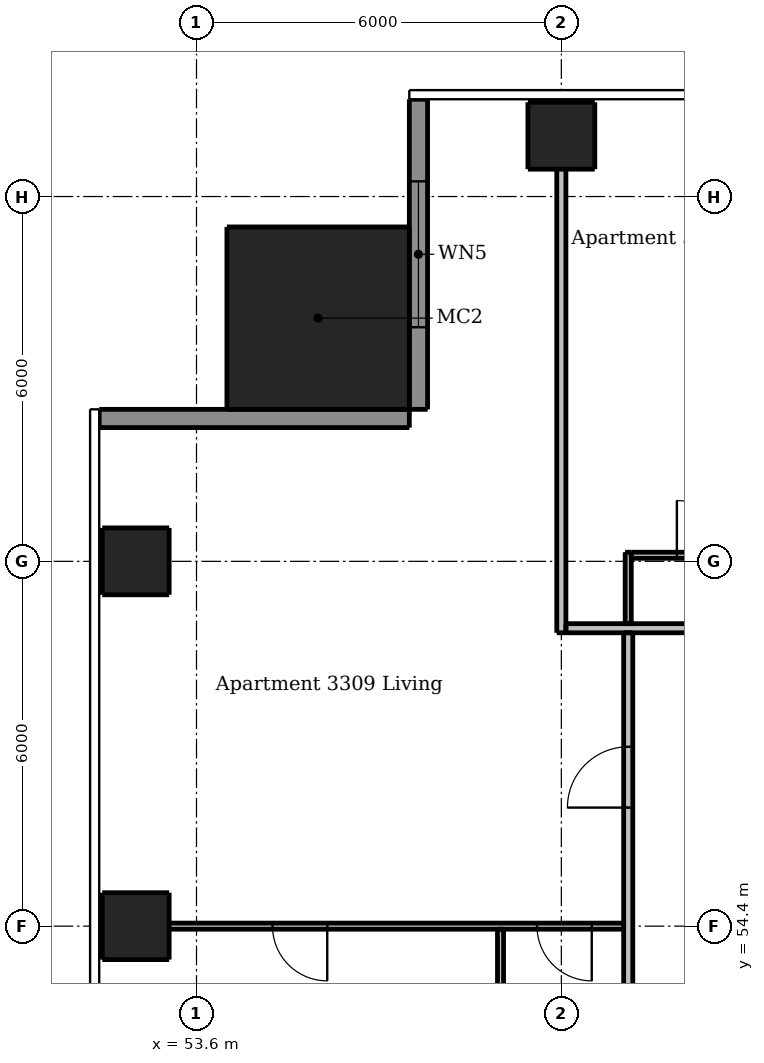
"""IFC4 building model, lengths in metres.
Left out: names, types, materials, properties, quantities, classifications, styles, units other than length and angle.
Written with IfcOpenShell. Run it as: python <this file> out.ifc"""

import sys

from ifc_helpers import new_model, si_unit, direction, frame, frame_2d, origin, origin_2d, place, context, subcontext, project, spatial, rectangle, extrude, element, fill, save


model = new_model("IFC4")
c1 = context("Model", 3, precision=1e-05, world=origin(), true_north=direction((0.0, 1.0)))
c2 = subcontext(c1, "Body", "Model", "MODEL_VIEW")
j1 = project(units=[si_unit("LENGTHUNIT", "METRE"), si_unit("PLANEANGLEUNIT", "RADIAN")], contexts=[c1])
p1 = place(None, origin())
s1 = spatial("IfcSite", under=j1, at=p1, CompositionType="ELEMENT")
p2 = place(p1, origin())
s2 = spatial("IfcBuilding", under=s1, at=p2, CompositionType="ELEMENT")
p3 = place(p2, frame((0.0, 0.0, 121.6)))
s3 = spatial("IfcBuildingStorey", under=s2, at=p3, CompositionType="ELEMENT", Elevation=121.6)
for number, where, z_axis, x_axis in (
    (1, (59.6, 67.4, 0.0), (0.0, 0.0, 1.0), (1.0, 0.0, 0.0)),
    (2, (52.6, 54.4, 0.0), (0.0, 0.0, 1.0), (1.0, 0.0, 0.0)),
    (3, (52.6, 60.4, 0.0), (0.0, 0.0, 1.0), (1.0, 0.0, 0.0)),
):
    element("IfcColumn", number, at=place(p3, frame(where, z_axis=z_axis, x_axis=x_axis)), inside=s3, PredefinedType="COLUMN", context=c2, shape_type="SweptSolid", body=[
        extrude(rectangle(XDim=1.1, YDim=1.1, at=origin_2d()), origin(), (0.0, 0.0, 1.0), 2.95),
    ])
p4 = place(p3, frame((55.6, 64.4, 0.0), z_axis=(0.0, 0.0, 1.0), x_axis=(1.0, 0.0, 0.0)))
e4 = element("IfcColumn", 4, at=p4, inside=s3, PredefinedType="COLUMN", context=c2, shape_type="SweptSolid", body=[
    extrude(rectangle(XDim=3.0, YDim=3.0, at=origin_2d()), origin(), (0.0, 0.0, 1.0), 3.3),
])
p5 = place(p3, frame((57.25, 68.0, 0.0), z_axis=(0.0, 0.0, 1.0), x_axis=(0.0, -1.0, 0.0)))
e5 = element("IfcWall", 5, at=p5, inside=s3, PredefinedType="SOLIDWALL", context=c2, shape_type="SweptSolid", body=[
    extrude(rectangle(XDim=5.1, YDim=0.3, at=frame_2d((2.55, 0.0))), origin(), (0.0, 0.0, 1.0), 2.95),
])
p6 = place(p5, frame((1.35, 0.0, 0.15)))
e6 = element("IfcOpeningElement", 6, at=p6, cuts=e5, PredefinedType="OPENING", context=c2, shape_type="SweptSolid", body=[
    extrude(rectangle(XDim=2.4, YDim=2.1, at=frame_2d((1.2, 1.05))), frame((0.0, 0.16, 0.0), z_axis=(0.0, -1.0, 0.0), x_axis=(1.0, 0.0, 0.0)), (0.0, 0.0, 1.0), 0.32),
])
p7 = place(p3, frame((57.1, 62.75, 0.0), z_axis=(0.0, 0.0, 1.0), x_axis=(-1.0, 0.0, 0.0)))
e7 = element("IfcWall", 7, at=p7, inside=s3, PredefinedType="SOLIDWALL", context=c2, shape_type="SweptSolid", body=[
    extrude(rectangle(XDim=5.1, YDim=0.3, at=frame_2d((2.55, 0.0))), origin(), (0.0, 0.0, 1.0), 2.95),
])
p8 = place(p3, frame((58.6, 54.35, 0.0), z_axis=(0.0, 0.0, 1.0), x_axis=(0.0, -1.0, 0.0)))
e8 = element("IfcWall", 8, at=p8, inside=s3, PredefinedType="PARTITIONING", context=c2, shape_type="SweptSolid", body=[
    extrude(rectangle(XDim=5.875, YDim=0.1, at=frame_2d((2.938, 0.0))), origin(), (0.0, 0.0, 1.0), 2.95),
])
p9 = place(p8, frame((3.75, 0.0, 0.0)))
e9 = element("IfcOpeningElement", 9, at=p9, cuts=e8, PredefinedType="OPENING", context=c2, shape_type="SweptSolid", body=[
    extrude(rectangle(XDim=0.8, YDim=2.1, at=frame_2d((0.4, 1.05))), frame((0.0, 0.06, 0.0), z_axis=(0.0, -1.0, 0.0), x_axis=(1.0, 0.0, 0.0)), (0.0, 0.0, 1.0), 0.12),
])
p10 = place(p3, frame((60.7, 59.375, 0.0), z_axis=(0.0, 0.0, 1.0), x_axis=(0.0, 1.0, 0.0)))
e10 = element("IfcWall", 10, at=p10, inside=s3, PredefinedType="PARTITIONING", context=c2, shape_type="SweptSolid", body=[
    extrude(rectangle(XDim=1.175, YDim=0.1, at=frame_2d((0.587, 0.0))), origin(), (0.0, 0.0, 1.0), 2.95),
])
p11 = place(p3, frame((60.75, 60.5, 0.0), z_axis=(0.0, 0.0, 1.0), x_axis=(1.0, 0.0, 0.0)))
e11 = element("IfcWall", 11, at=p11, inside=s3, PredefinedType="PARTITIONING", context=c2, shape_type="SweptSolid", body=[
    extrude(rectangle(XDim=16.775, YDim=0.1, at=frame_2d((8.387, 0.0))), origin(), (0.0, 0.0, 1.0), 2.95),
])
p12 = place(p11, frame((9.8, 0.0, 0.0)))
e12 = element("IfcOpeningElement", 12, at=p12, cuts=e11, PredefinedType="OPENING", context=c2, shape_type="SweptSolid", body=[
    extrude(rectangle(XDim=0.9, YDim=2.1, at=frame_2d((0.45, 1.05))), frame((0.0, 0.06, 0.0), z_axis=(0.0, -1.0, 0.0), x_axis=(1.0, 0.0, 0.0)), (0.0, 0.0, 1.0), 0.12),
])
p13 = place(p11, frame((14.9, 0.0, 0.0)))
e13 = element("IfcOpeningElement", 13, at=p13, cuts=e11, PredefinedType="OPENING", context=c2, shape_type="SweptSolid", body=[
    extrude(rectangle(XDim=0.9, YDim=2.1, at=frame_2d((0.45, 1.05))), frame((0.0, 0.06, 0.0), z_axis=(0.0, -1.0, 0.0), x_axis=(1.0, 0.0, 0.0)), (0.0, 0.0, 1.0), 0.12),
])
p14 = place(p11, frame((12.5, 0.0, 0.0)))
e14 = element("IfcOpeningElement", 14, at=p14, cuts=e11, PredefinedType="OPENING", context=c2, shape_type="SweptSolid", body=[
    extrude(rectangle(XDim=0.9, YDim=2.1, at=frame_2d((0.45, 1.05))), frame((0.0, 0.06, 0.0), z_axis=(0.0, -1.0, 0.0), x_axis=(1.0, 0.0, 0.0)), (0.0, 0.0, 1.0), 0.12),
])
p15 = place(p11, frame((5.3, 0.0, 0.0)))
e15 = element("IfcOpeningElement", 15, at=p15, cuts=e11, PredefinedType="OPENING", context=c2, shape_type="SweptSolid", body=[
    extrude(rectangle(XDim=0.9, YDim=2.1, at=frame_2d((0.45, 1.05))), frame((0.0, 0.06, 0.0), z_axis=(0.0, -1.0, 0.0), x_axis=(1.0, 0.0, 0.0)), (0.0, 0.0, 1.0), 0.12),
])
p16 = place(p11, frame((7.15, 0.0, 0.0)))
e16 = element("IfcOpeningElement", 16, at=p16, cuts=e11, PredefinedType="OPENING", context=c2, shape_type="SweptSolid", body=[
    extrude(rectangle(XDim=0.8, YDim=2.1, at=frame_2d((0.4, 1.05))), frame((0.0, 0.06, 0.0), z_axis=(0.0, -1.0, 0.0), x_axis=(1.0, 0.0, 0.0)), (0.0, 0.0, 1.0), 0.12),
])
p17 = place(p11, frame((0.75, 0.0, 0.0)))
e17 = element("IfcOpeningElement", 17, at=p17, cuts=e11, PredefinedType="OPENING", context=c2, shape_type="SweptSolid", body=[
    extrude(rectangle(XDim=0.9, YDim=2.1, at=frame_2d((0.45, 1.05))), frame((0.0, 0.06, 0.0), z_axis=(0.0, -1.0, 0.0), x_axis=(1.0, 0.0, 0.0)), (0.0, 0.0, 1.0), 0.12),
])
p18 = place(p11, frame((3.25, 0.0, 0.0)))
e18 = element("IfcOpeningElement", 18, at=p18, cuts=e11, PredefinedType="OPENING", context=c2, shape_type="SweptSolid", body=[
    extrude(rectangle(XDim=0.8, YDim=2.1, at=frame_2d((0.4, 1.05))), frame((0.0, 0.06, 0.0), z_axis=(0.0, -1.0, 0.0), x_axis=(1.0, 0.0, 0.0)), (0.0, 0.0, 1.0), 0.12),
])
p19 = place(p3, frame((60.625, 54.4, 0.0), z_axis=(0.0, 0.0, 1.0), x_axis=(-1.0, 0.0, 0.0)))
e19 = element("IfcWall", 19, at=p19, inside=s3, PredefinedType="PARTITIONING", context=c2, shape_type="SweptSolid", body=[
    extrude(rectangle(XDim=8.625, YDim=0.1, at=frame_2d((4.312, 0.0))), origin(), (0.0, 0.0, 1.0), 2.332),
])
p20 = place(p19, frame((0.525, 0.0, 0.0)))
e20 = element("IfcOpeningElement", 20, at=p20, cuts=e19, PredefinedType="OPENING", context=c2, shape_type="SweptSolid", body=[
    extrude(rectangle(XDim=0.9, YDim=2.1, at=frame_2d((0.45, 1.05))), frame((0.0, 0.06, 0.0), z_axis=(0.0, -1.0, 0.0), x_axis=(1.0, 0.0, 0.0)), (0.0, 0.0, 1.0), 0.12),
])
p21 = place(p19, frame((4.875, 0.0, 0.0)))
e21 = element("IfcOpeningElement", 21, at=p21, cuts=e19, PredefinedType="OPENING", context=c2, shape_type="SweptSolid", body=[
    extrude(rectangle(XDim=0.9, YDim=2.1, at=frame_2d((0.45, 1.05))), frame((0.0, 0.06, 0.0), z_axis=(0.0, -1.0, 0.0), x_axis=(1.0, 0.0, 0.0)), (0.0, 0.0, 1.0), 0.12),
])
p22 = place(p3, frame((59.6, 59.225, 0.0), z_axis=(0.0, 0.0, 1.0), x_axis=(0.0, 1.0, 0.0)))
e22 = element("IfcWall", 22, at=p22, inside=s3, PredefinedType="PARTITIONING", context=c2, shape_type="SweptSolid", body=[
    extrude(rectangle(XDim=8.775, YDim=0.15, at=frame_2d((4.387, 0.0))), origin(), (0.0, 0.0, 1.0), 2.332),
])
p23 = place(p3, frame((60.7, 30.325, 0.0), z_axis=(0.0, 0.0, 1.0), x_axis=(0.0, 1.0, 0.0)))
e23 = element("IfcWall", 23, at=p23, inside=s3, PredefinedType="PARTITIONING", context=c2, shape_type="SweptSolid", body=[
    extrude(rectangle(XDim=28.9, YDim=0.15, at=frame_2d((14.45, 0.0))), origin(), (0.0, 0.0, 1.0), 2.95),
])
p24 = place(p23, frame((9.225, 0.0, 0.0)))
e24 = element("IfcOpeningElement", 24, at=p24, cuts=e23, PredefinedType="OPENING", context=c2, shape_type="SweptSolid", body=[
    extrude(rectangle(XDim=1.0, YDim=2.1, at=frame_2d((0.5, 1.05))), frame((0.0, 0.085, 0.0), z_axis=(0.0, -1.0, 0.0), x_axis=(1.0, 0.0, 0.0)), (0.0, 0.0, 1.0), 0.17),
])
p25 = place(p23, frame((26.025, 0.0, 0.0)))
e25 = element("IfcOpeningElement", 25, at=p25, cuts=e23, PredefinedType="OPENING", context=c2, shape_type="SweptSolid", body=[
    extrude(rectangle(XDim=1.0, YDim=2.1, at=frame_2d((0.5, 1.05))), frame((0.0, 0.085, 0.0), z_axis=(0.0, -1.0, 0.0), x_axis=(1.0, 0.0, 0.0)), (0.0, 0.0, 1.0), 0.17),
])
p26 = place(p3, frame((59.675, 59.3, 0.0), z_axis=(0.0, 0.0, 1.0), x_axis=(1.0, 0.0, 0.0)))
e26 = element("IfcWall", 26, at=p26, inside=s3, PredefinedType="PARTITIONING", context=c2, shape_type="SweptSolid", body=[
    extrude(rectangle(XDim=28.55, YDim=0.15, at=frame_2d((14.275, 0.0))), origin(), (0.0, 0.0, 1.0), 2.95),
])
p27 = place(p26, frame((8.975, 0.0, 0.0)))
e27 = element("IfcOpeningElement", 27, at=p27, cuts=e26, PredefinedType="OPENING", context=c2, shape_type="SweptSolid", body=[
    extrude(rectangle(XDim=1.0, YDim=2.1, at=frame_2d((0.5, 1.05))), frame((0.0, 0.085, 0.0), z_axis=(0.0, -1.0, 0.0), x_axis=(1.0, 0.0, 0.0)), (0.0, 0.0, 1.0), 0.17),
])
p28 = place(p26, frame((25.775, 0.0, 0.0)))
e28 = element("IfcOpeningElement", 28, at=p28, cuts=e26, PredefinedType="OPENING", context=c2, shape_type="SweptSolid", body=[
    extrude(rectangle(XDim=1.0, YDim=2.1, at=frame_2d((0.5, 1.05))), frame((0.0, 0.085, 0.0), z_axis=(0.0, -1.0, 0.0), x_axis=(1.0, 0.0, 0.0)), (0.0, 0.0, 1.0), 0.17),
])
p29 = place(p6, origin())
e29 = element("IfcWindow", 29, at=p29, inside=s3, PartitioningType="DOUBLE_PANEL_VERTICAL", PredefinedType="WINDOW", context=c2, shape_type="SweptSolid", body=[
    extrude(rectangle(XDim=2.4, YDim=2.1, at=frame_2d((1.2, 1.05))), frame((0.0, 0.03, 0.0), z_axis=(0.0, -1.0, 0.0), x_axis=(1.0, 0.0, 0.0)), (0.0, 0.0, 1.0), 0.06),
])
fill(e6, e29)
p30 = place(p17, origin())
e30 = element("IfcDoor", 30, at=p30, inside=s3, OperationType="SINGLE_SWING_LEFT", PredefinedType="DOOR", context=c2, shape_type="SweptSolid", body=[
    extrude(rectangle(XDim=0.9, YDim=2.1, at=frame_2d((0.45, 1.05))), frame((0.0, 0.025, 0.0), z_axis=(0.0, -1.0, 0.0), x_axis=(1.0, 0.0, 0.0)), (0.0, 0.0, 1.0), 0.05),
])
fill(e17, e30)
p31 = place(p25, origin())
e31 = element("IfcDoor", 31, at=p31, inside=s3, OperationType="SINGLE_SWING_LEFT", PredefinedType="DOOR", context=c2, shape_type="SweptSolid", body=[
    extrude(rectangle(XDim=1.0, YDim=2.1, at=frame_2d((0.5, 1.05))), frame((0.0, 0.025, 0.0), z_axis=(0.0, -1.0, 0.0), x_axis=(1.0, 0.0, 0.0)), (0.0, 0.0, 1.0), 0.05),
])
fill(e25, e31)
p32 = place(p20, origin())
e32 = element("IfcDoor", 32, at=p32, inside=s3, OperationType="SINGLE_SWING_LEFT", PredefinedType="DOOR", context=c2, shape_type="SweptSolid", body=[
    extrude(rectangle(XDim=0.9, YDim=2.1, at=frame_2d((0.45, 1.05))), frame((0.0, 0.025, 0.0), z_axis=(0.0, -1.0, 0.0), x_axis=(1.0, 0.0, 0.0)), (0.0, 0.0, 1.0), 0.05),
])
fill(e20, e32)
p33 = place(p21, origin())
e33 = element("IfcDoor", 33, at=p33, inside=s3, OperationType="SINGLE_SWING_LEFT", PredefinedType="DOOR", context=c2, shape_type="SweptSolid", body=[
    extrude(rectangle(XDim=0.9, YDim=2.1, at=frame_2d((0.45, 1.05))), frame((0.0, 0.025, 0.0), z_axis=(0.0, -1.0, 0.0), x_axis=(1.0, 0.0, 0.0)), (0.0, 0.0, 1.0), 0.05),
])
fill(e21, e33)
save(model, sys.argv[1])
